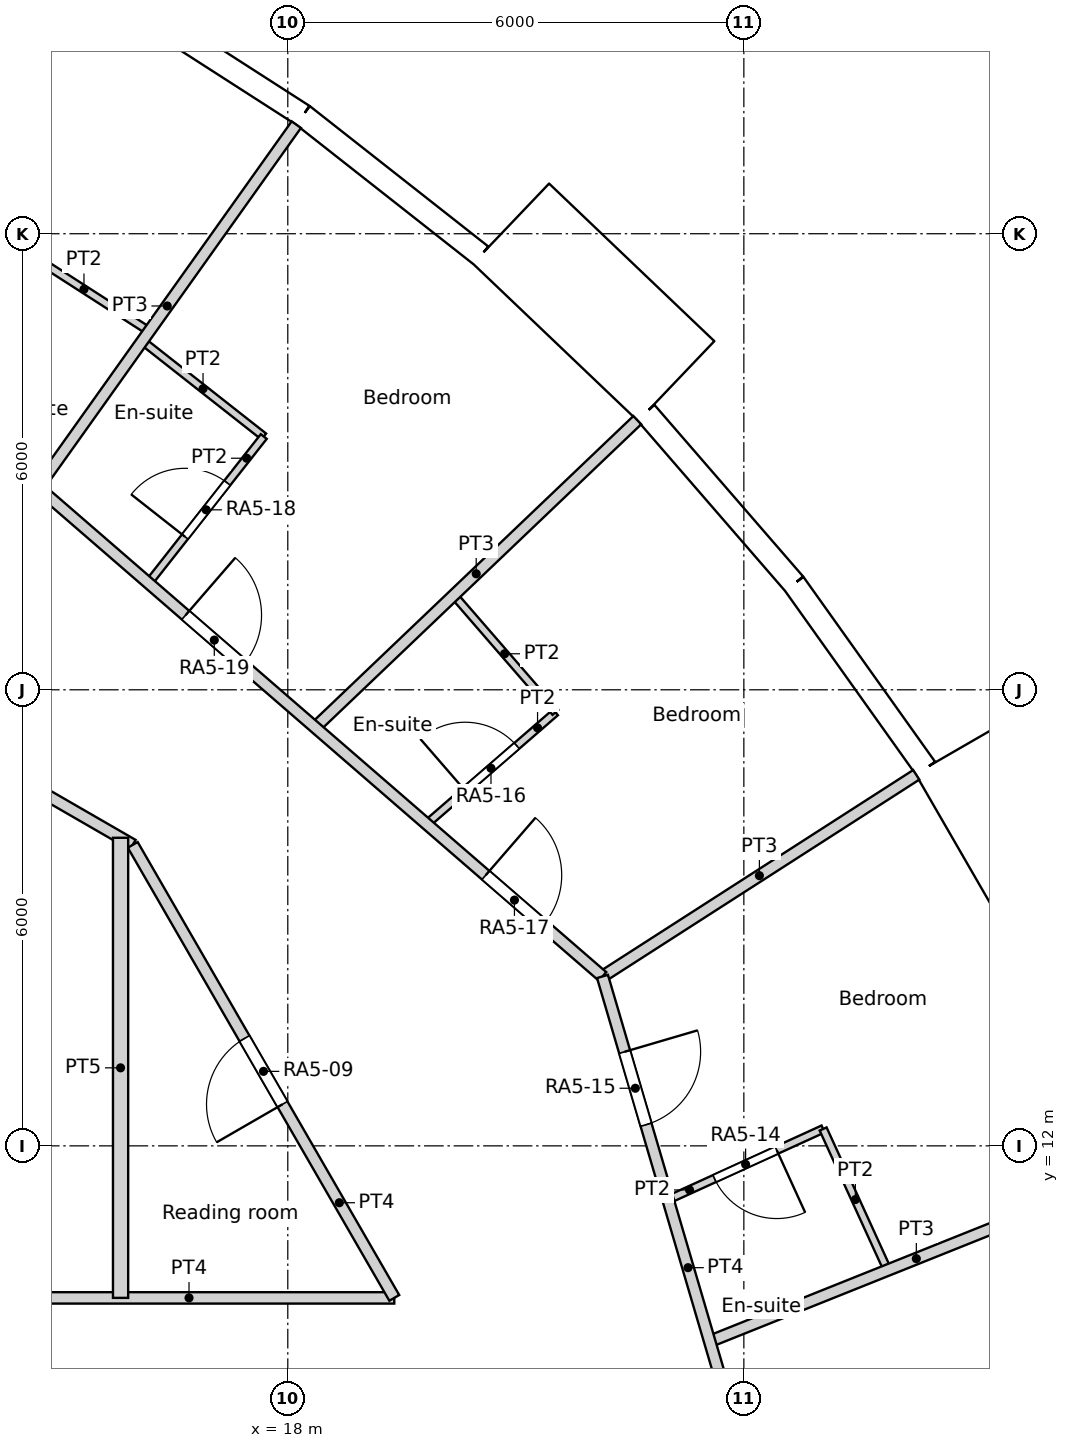
"""IFC4 building model, lengths in metres.
Left out: names, types, materials, properties, quantities, classifications, styles, units other than length and angle.
Written with IfcOpenShell. Run it as: python <this file> out.ifc"""

import sys

from ifc_helpers import new_model, si_unit, direction, frame, frame_2d, origin, origin_2d, place, context, subcontext, project, spatial, rectangle, circle, extrude, element, fill, save


model = new_model("IFC4")
c1 = context("Model", 3, precision=1e-05, world=origin(), true_north=direction((0.0, 1.0)))
c2 = subcontext(c1, "Body", "Model", "MODEL_VIEW")
j1 = project(units=[si_unit("LENGTHUNIT", "METRE"), si_unit("PLANEANGLEUNIT", "RADIAN")], contexts=[c1])
p1 = place(None, origin())
s1 = spatial("IfcSite", under=j1, at=p1, CompositionType="ELEMENT")
p2 = place(p1, origin())
s2 = spatial("IfcBuilding", under=s1, at=p2, CompositionType="ELEMENT")
p3 = place(p2, frame((0.0, 0.0, 71.4)))
s3 = spatial("IfcBuildingStorey", under=s2, at=p3, CompositionType="ELEMENT", Elevation=71.4)
for number, where, z_axis, x_axis in (
    (1, (25.469, 16.368, 0.0), (0.0, 0.0, 1.0), (1.0, 0.0, 0.0)),
    (2, (21.911, 20.892, 0.0), (0.0, 0.0, 1.0), (1.0, 0.0, 0.0)),
    (3, (17.561, 24.661, 0.0), (0.0, 0.0, 1.0), (1.0, 0.0, 0.0)),
):
    element("IfcColumn", number, at=place(p3, frame(where, z_axis=z_axis, x_axis=x_axis)), inside=s3, PredefinedType="COLUMN", context=c2, shape_type="SweptSolid", body=[
        extrude(circle(Radius=0.6, at=origin_2d()), origin(), (0.0, 0.0, 1.0), 3.6),
    ])
for number, where, z_axis, x_axis in (
    (4, (21.937, 11.017, 0.0), (0.0, 0.0, 1.0), (1.0, 0.0, 0.0)),
    (5, (18.805, 15.779, 0.0), (0.0, 0.0, 1.0), (1.0, 0.0, 0.0)),
    (6, (14.659, 19.69, 0.0), (0.0, 0.0, 1.0), (1.0, 0.0, 0.0)),
):
    element("IfcColumn", number, at=place(p3, frame(where, z_axis=z_axis, x_axis=x_axis)), inside=s3, PredefinedType="COLUMN", context=c2, shape_type="SweptSolid", body=[
        extrude(circle(Radius=0.65, at=origin_2d()), origin(), (0.0, 0.0, 1.0), 3.6),
    ])
p4 = place(p3, frame((15.552, 10.603, 0.0), z_axis=(0.0, 0.0, 1.0), x_axis=(1.0, 0.0, 0.0)))
e7 = element("IfcColumn", 7, at=p4, inside=s3, PredefinedType="COLUMN", context=c2, shape_type="SweptSolid", body=[
    extrude(circle(Radius=0.7, at=origin_2d()), origin(), (0.0, 0.0, 1.0), 3.6),
])
p5 = place(p3, frame((28.388, 14.658, -0.45), z_axis=(0.0, 0.0, 1.0), x_axis=(-0.499990139034, 0.866031096941, 0.0)))
e8 = element("IfcWall", 8, at=p5, inside=s3, PredefinedType="ELEMENTEDWALL", context=c2, shape_type="SweptSolid", body=[
    extrude(rectangle(XDim=3.0, YDim=1.45, at=frame_2d((1.5, 0.0))), origin(), (0.0, 0.0, 1.0), 3.6),
])
p6 = place(p5, frame((1.5, 0.0, 2.0)))
e9 = element("IfcOpeningElement", 9, at=p6, cuts=e8, PredefinedType="OPENING", context=c2, shape_type="SweptSolid", body=[
    extrude(circle(Radius=0.9, at=origin_2d()), frame((0.0, 0.735, 0.0), z_axis=(0.0, -1.0, 0.0), x_axis=(1.0, 0.0, 0.0)), (0.0, 0.0, 1.0), 1.47),
])
p7 = place(p3, frame((26.39, 16.967, 0.0), z_axis=(0.0, 0.0, 1.0), x_axis=(-0.580113774115, 0.814535456, 0.0)))
e10 = element("IfcWall", 10, at=p7, inside=s3, PredefinedType="SOLIDWALL", context=c2, shape_type="SweptSolid", body=[
    extrude(rectangle(XDim=2.98, YDim=0.3, at=frame_2d((1.49, 0.0))), origin(), (0.0, 0.0, 1.0), 3.15),
])
p8 = place(p7, frame((1.49, 0.0, 1.55)))
e11 = element("IfcOpeningElement", 11, at=p8, cuts=e10, PredefinedType="OPENING", context=c2, shape_type="SweptSolid", body=[
    extrude(circle(Radius=0.9, at=origin_2d()), frame((0.0, 0.16, 0.0), z_axis=(0.0, -1.0, 0.0), x_axis=(1.0, 0.0, 0.0)), (0.0, 0.0, 1.0), 0.32),
])
p9 = place(p3, frame((24.662, 19.394, 0.0), z_axis=(0.0, 0.0, 1.0), x_axis=(-0.654830712471, 0.755775587066, 0.0)))
e12 = element("IfcWall", 12, at=p9, inside=s3, PredefinedType="SOLIDWALL", context=c2, shape_type="SweptSolid", body=[
    extrude(rectangle(XDim=2.98, YDim=0.3, at=frame_2d((1.49, 0.0))), origin(), (0.0, 0.0, 1.0), 3.15),
])
p10 = place(p9, frame((1.49, 0.0, 1.55)))
e13 = element("IfcOpeningElement", 13, at=p10, cuts=e12, PredefinedType="OPENING", context=c2, shape_type="SweptSolid", body=[
    extrude(circle(Radius=0.9, at=origin_2d()), frame((0.0, 0.16, 0.0), z_axis=(0.0, -1.0, 0.0), x_axis=(1.0, 0.0, 0.0)), (0.0, 0.0, 1.0), 0.32),
])
p11 = place(p3, frame((23.109, 22.062, -0.45), z_axis=(0.0, 0.0, 1.0), x_axis=(-0.723712023899, 0.690102098579, 0.0)))
e14 = element("IfcWall", 14, at=p11, inside=s3, PredefinedType="ELEMENTEDWALL", context=c2, shape_type="SweptSolid", body=[
    extrude(rectangle(XDim=3.0, YDim=1.45, at=frame_2d((1.5, 0.0))), origin(), (0.0, 0.0, 1.0), 3.6),
])
p12 = place(p11, frame((1.5, 0.0, 2.0)))
e15 = element("IfcOpeningElement", 15, at=p12, cuts=e14, PredefinedType="OPENING", context=c2, shape_type="SweptSolid", body=[
    extrude(circle(Radius=0.9, at=origin_2d()), frame((0.0, 0.735, 0.0), z_axis=(0.0, -1.0, 0.0), x_axis=(1.0, 0.0, 0.0)), (0.0, 0.0, 1.0), 1.47),
])
p13 = place(p3, frame((20.541, 23.715, 0.0), z_axis=(0.0, 0.0, 1.0), x_axis=(-0.786053834673, 0.618158045322, 0.0)))
e16 = element("IfcWall", 16, at=p13, inside=s3, PredefinedType="SOLIDWALL", context=c2, shape_type="SweptSolid", body=[
    extrude(rectangle(XDim=2.979, YDim=0.3, at=frame_2d((1.49, 0.0))), origin(), (0.0, 0.0, 1.0), 3.15),
])
p14 = place(p13, frame((1.49, 0.0, 1.55)))
e17 = element("IfcOpeningElement", 17, at=p14, cuts=e16, PredefinedType="OPENING", context=c2, shape_type="SweptSolid", body=[
    extrude(circle(Radius=0.9, at=origin_2d()), frame((0.0, 0.16, 0.0), z_axis=(0.0, -1.0, 0.0), x_axis=(1.0, 0.0, 0.0)), (0.0, 0.0, 1.0), 0.32),
])
p15 = place(p3, frame((18.199, 25.557, 0.0), z_axis=(0.0, 0.0, 1.0), x_axis=(-0.841260995538, 0.54062920508, 0.0)))
e18 = element("IfcWall", 18, at=p15, inside=s3, PredefinedType="SOLIDWALL", context=c2, shape_type="SweptSolid", body=[
    extrude(rectangle(XDim=2.979, YDim=0.3, at=frame_2d((1.49, 0.0))), origin(), (0.0, 0.0, 1.0), 3.15),
])
p16 = place(p15, frame((1.49, 0.0, 1.55)))
e19 = element("IfcOpeningElement", 19, at=p16, cuts=e18, PredefinedType="OPENING", context=c2, shape_type="SweptSolid", body=[
    extrude(circle(Radius=0.9, at=origin_2d()), frame((0.0, 0.16, 0.0), z_axis=(0.0, -1.0, 0.0), x_axis=(1.0, 0.0, 0.0)), (0.0, 0.0, 1.0), 0.32),
])
p17 = place(p3, frame((14.0, 10.0, 0.0), z_axis=(0.0, 0.0, 1.0), x_axis=(1.0, 0.0, 0.0)))
e20 = element("IfcWall", 20, at=p17, inside=s3, PredefinedType="PARTITIONING", context=c2, shape_type="SweptSolid", body=[
    extrude(rectangle(XDim=5.401, YDim=0.15, at=frame_2d((2.7, 0.0))), origin(), (0.0, 0.0, 1.0), 3.15),
])
p18 = place(p3, frame((15.96, 15.96, 0.0), z_axis=(0.0, 0.0, 1.0), x_axis=(0.499992689227, -0.86602962462, 0.0)))
e21 = element("IfcWall", 21, at=p18, inside=s3, PredefinedType="PARTITIONING", context=c2, shape_type="SweptSolid", body=[
    extrude(rectangle(XDim=6.882, YDim=0.15, at=frame_2d((3.441, 0.0))), origin(), (0.0, 0.0, 1.0), 3.15),
])
p19 = place(p18, frame((2.941, 0.0, 0.0)))
e22 = element("IfcOpeningElement", 22, at=p19, cuts=e21, PredefinedType="OPENING", context=c2, shape_type="SweptSolid", body=[
    extrude(rectangle(XDim=1.0, YDim=2.04, at=frame_2d((0.5, 1.02))), frame((0.0, 0.075, 0.0), z_axis=(0.0, -1.0, 0.0), x_axis=(1.0, 0.0, 0.0)), (0.0, 0.0, 1.0), 0.15),
])
p20 = place(p3, frame((22.14, 14.229, 0.0), z_axis=(0.0, 0.0, 1.0), x_axis=(0.281780364869, -0.959478934617, 0.0)))
e23 = element("IfcWall", 23, at=p20, inside=s3, PredefinedType="PARTITIONING", context=c2, shape_type="SweptSolid", body=[
    extrude(rectangle(XDim=14.83, YDim=0.15, at=frame_2d((7.415, 0.0))), origin(), (0.0, 0.0, 1.0), 3.15),
])
p21 = place(p20, frame((10.816, 0.0, 0.0)))
e24 = element("IfcOpeningElement", 24, at=p21, cuts=e23, PredefinedType="OPENING", context=c2, shape_type="SweptSolid", body=[
    extrude(rectangle(XDim=1.0, YDim=2.1, at=frame_2d((0.5, 1.05))), frame((0.0, 0.075, 0.0), z_axis=(0.0, -1.0, 0.0), x_axis=(1.0, 0.0, 0.0)), (0.0, 0.0, 1.0), 0.15),
])
p22 = place(p20, frame((5.953, 0.0, 0.0)))
e25 = element("IfcOpeningElement", 25, at=p22, cuts=e23, PredefinedType="OPENING", context=c2, shape_type="SweptSolid", body=[
    extrude(rectangle(XDim=1.0, YDim=2.1, at=frame_2d((0.5, 1.05))), frame((0.0, 0.075, 0.0), z_axis=(0.0, -1.0, 0.0), x_axis=(1.0, 0.0, 0.0)), (0.0, 0.0, 1.0), 0.15),
])
p23 = place(p20, frame((1.033, 0.0, 0.0)))
e26 = element("IfcOpeningElement", 26, at=p23, cuts=e23, PredefinedType="OPENING", context=c2, shape_type="SweptSolid", body=[
    extrude(rectangle(XDim=1.0, YDim=2.1, at=frame_2d((0.5, 1.05))), frame((0.0, 0.075, 0.0), z_axis=(0.0, -1.0, 0.0), x_axis=(1.0, 0.0, 0.0)), (0.0, 0.0, 1.0), 0.15),
])
p24 = place(p3, frame((10.932, 23.939, 0.0), z_axis=(0.0, 0.0, 1.0), x_axis=(0.755838982892, -0.654757536757, 0.0)))
e27 = element("IfcWall", 27, at=p24, inside=s3, PredefinedType="PARTITIONING", context=c2, shape_type="SweptSolid", body=[
    extrude(rectangle(XDim=14.83, YDim=0.15, at=frame_2d((7.415, 0.0))), origin(), (0.0, 0.0, 1.0), 3.15),
])
p25 = place(p24, frame((12.796, 0.0, 0.0)))
e28 = element("IfcOpeningElement", 28, at=p25, cuts=e27, PredefinedType="OPENING", context=c2, shape_type="SweptSolid", body=[
    extrude(rectangle(XDim=1.0, YDim=2.1, at=frame_2d((0.5, 1.05))), frame((0.0, 0.075, 0.0), z_axis=(0.0, -1.0, 0.0), x_axis=(1.0, 0.0, 0.0)), (0.0, 0.0, 1.0), 0.15),
])
p26 = place(p24, frame((7.572, 0.0, 0.0)))
e29 = element("IfcOpeningElement", 29, at=p26, cuts=e27, PredefinedType="OPENING", context=c2, shape_type="SweptSolid", body=[
    extrude(rectangle(XDim=1.0, YDim=2.1, at=frame_2d((0.5, 1.05))), frame((0.0, 0.075, 0.0), z_axis=(0.0, -1.0, 0.0), x_axis=(1.0, 0.0, 0.0)), (0.0, 0.0, 1.0), 0.15),
])
p27 = place(p24, frame((1.033, 0.0, 0.0)))
e30 = element("IfcOpeningElement", 30, at=p27, cuts=e27, PredefinedType="OPENING", context=c2, shape_type="SweptSolid", body=[
    extrude(rectangle(XDim=1.0, YDim=2.1, at=frame_2d((0.5, 1.05))), frame((0.0, 0.075, 0.0), z_axis=(0.0, -1.0, 0.0), x_axis=(1.0, 0.0, 0.0)), (0.0, 0.0, 1.0), 0.15),
])
p28 = place(p3, frame((11.336, 18.63, 0.0), z_axis=(0.0, 0.0, 1.0), x_axis=(0.866056911224, -0.499945423543, 0.0)))
e31 = element("IfcWall", 31, at=p28, inside=s3, PredefinedType="PARTITIONING", context=c2, shape_type="SweptSolid", body=[
    extrude(rectangle(XDim=5.339, YDim=0.15, at=frame_2d((2.67, 0.0))), origin(), (0.0, 0.0, 1.0), 3.15),
])
p29 = place(p3, frame((15.8, 10.0, 0.0), z_axis=(0.0, 0.0, 1.0), x_axis=(0.0, 1.0, 0.0)))
e32 = element("IfcWall", 32, at=p29, inside=s3, PredefinedType="PARTITIONING", context=c2, shape_type="SweptSolid", body=[
    extrude(rectangle(XDim=6.053, YDim=0.2, at=frame_2d((3.026, 0.0))), origin(), (0.0, 0.0, 1.0), 3.15),
])
p30 = place(p3, frame((23.55, 9.427, 0.0), z_axis=(0.0, 0.0, 1.0), x_axis=(0.928307005382, 0.371814609393, 0.0)))
e33 = element("IfcWall", 33, at=p30, inside=s3, PredefinedType="PARTITIONING", context=c2, shape_type="SweptSolid", body=[
    extrude(rectangle(XDim=5.858, YDim=0.15, at=frame_2d((2.929, 0.0))), origin(), (0.0, 0.0, 1.0), 3.15),
])
p31 = place(p3, frame((25.043, 12.222, 0.0), z_axis=(0.0, 0.0, 1.0), x_axis=(0.41546015385, -0.909611378866, 0.0)))
e34 = element("IfcWall", 34, at=p31, inside=s3, PredefinedType="PARTITIONING", context=c2, shape_type="SweptSolid", body=[
    extrude(rectangle(XDim=2.042, YDim=0.1, at=frame_2d((1.021, 0.0))), origin(), (0.0, 0.0, 1.0), 3.15),
])
p32 = place(p3, frame((23.003, 11.291, 0.0), z_axis=(0.0, 0.0, 1.0), x_axis=(0.90975773562, 0.41513956988, 0.0)))
e35 = element("IfcWall", 35, at=p32, inside=s3, PredefinedType="PARTITIONING", context=c2, shape_type="SweptSolid", body=[
    extrude(rectangle(XDim=2.242, YDim=0.1, at=frame_2d((1.121, 0.0))), origin(), (0.0, 0.0, 1.0), 3.15),
])
p33 = place(p32, frame((0.671, 0.0, 0.0)))
e36 = element("IfcOpeningElement", 36, at=p33, cuts=e35, PredefinedType="OPENING", context=c2, shape_type="SweptSolid", body=[
    extrude(rectangle(XDim=0.9, YDim=2.04, at=frame_2d((0.45, 1.02))), frame((0.0, 0.05, 0.0), z_axis=(0.0, -1.0, 0.0), x_axis=(1.0, 0.0, 0.0)), (0.0, 0.0, 1.0), 0.1),
])
p34 = place(p3, frame((22.141, 14.229, 0.0), z_axis=(0.0, 0.0, 1.0), x_axis=(0.841265781699, 0.540621757371, 0.0)))
e37 = element("IfcWall", 37, at=p34, inside=s3, PredefinedType="PARTITIONING", context=c2, shape_type="SweptSolid", body=[
    extrude(rectangle(XDim=4.906, YDim=0.15, at=frame_2d((2.453, 0.0))), origin(), (0.0, 0.0, 1.0), 3.15),
])
p35 = place(p3, frame((19.826, 16.234, 0.0), z_axis=(0.0, 0.0, 1.0), x_axis=(0.755703447798, 0.654913963042, 0.0)))
e38 = element("IfcWall", 38, at=p35, inside=s3, PredefinedType="PARTITIONING", context=c2, shape_type="SweptSolid", body=[
    extrude(rectangle(XDim=2.243, YDim=0.1, at=frame_2d((1.122, 0.0))), origin(), (0.0, 0.0, 1.0), 3.15),
])
p36 = place(p35, frame((0.671, 0.0, 0.0)))
e39 = element("IfcOpeningElement", 39, at=p36, cuts=e38, PredefinedType="OPENING", context=c2, shape_type="SweptSolid", body=[
    extrude(rectangle(XDim=0.9, YDim=2.04, at=frame_2d((0.45, 1.02))), frame((0.0, 0.05, 0.0), z_axis=(0.0, -1.0, 0.0), x_axis=(1.0, 0.0, 0.0)), (0.0, 0.0, 1.0), 0.1),
])
p37 = place(p3, frame((20.184, 19.245, 0.0), z_axis=(0.0, 0.0, 1.0), x_axis=(0.655017058368, -0.755614090159, 0.0)))
e40 = element("IfcWall", 40, at=p37, inside=s3, PredefinedType="PARTITIONING", context=c2, shape_type="SweptSolid", body=[
    extrude(rectangle(XDim=2.041, YDim=0.1, at=frame_2d((1.021, 0.0))), origin(), (0.0, 0.0, 1.0), 3.15),
])
p38 = place(p3, frame((18.36, 17.505, 0.0), z_axis=(0.0, 0.0, 1.0), x_axis=(0.723686703731, 0.690128650937, 0.0)))
e41 = element("IfcWall", 41, at=p38, inside=s3, PredefinedType="PARTITIONING", context=c2, shape_type="SweptSolid", body=[
    extrude(rectangle(XDim=5.856, YDim=0.15, at=frame_2d((2.928, 0.0))), origin(), (0.0, 0.0, 1.0), 3.15),
])
p39 = place(p3, frame((16.168, 19.404, 0.0), z_axis=(0.0, 0.0, 1.0), x_axis=(0.618142414415, 0.786066126672, 0.0)))
e42 = element("IfcWall", 42, at=p39, inside=s3, PredefinedType="PARTITIONING", context=c2, shape_type="SweptSolid", body=[
    extrude(rectangle(XDim=2.453, YDim=0.1, at=frame_2d((1.226, 0.0))), origin(), (0.0, 0.0, 1.0), 3.15),
])
p40 = place(p39, frame((0.776, 0.0, 0.0)))
e43 = element("IfcOpeningElement", 43, at=p40, cuts=e42, PredefinedType="OPENING", context=c2, shape_type="SweptSolid", body=[
    extrude(rectangle(XDim=0.9, YDim=2.04, at=frame_2d((0.45, 1.02))), frame((0.0, 0.05, 0.0), z_axis=(0.0, -1.0, 0.0), x_axis=(1.0, 0.0, 0.0)), (0.0, 0.0, 1.0), 0.1),
])
p41 = place(p3, frame((16.086, 22.589, 0.0), z_axis=(0.0, 0.0, 1.0), x_axis=(0.785984904201, -0.618245687707, 0.0)))
e44 = element("IfcWall", 44, at=p41, inside=s3, PredefinedType="PARTITIONING", context=c2, shape_type="SweptSolid", body=[
    extrude(rectangle(XDim=2.033, YDim=0.1, at=frame_2d((1.017, 0.0))), origin(), (0.0, 0.0, 1.0), 3.15),
])
p42 = place(p3, frame((14.715, 20.664, 0.0), z_axis=(0.0, 0.0, 1.0), x_axis=(0.57995989616, 0.814645026282, 0.0)))
e45 = element("IfcWall", 45, at=p42, inside=s3, PredefinedType="PARTITIONING", context=c2, shape_type="SweptSolid", body=[
    extrude(rectangle(XDim=5.857, YDim=0.15, at=frame_2d((2.928, 0.0))), origin(), (0.0, 0.0, 1.0), 3.15),
])
p43 = place(p3, frame((14.46, 23.821, 0.0), z_axis=(0.0, 0.0, 1.0), x_axis=(0.841135728185, -0.540824081168, 0.0)))
e46 = element("IfcWall", 46, at=p43, inside=s3, PredefinedType="PARTITIONING", context=c2, shape_type="SweptSolid", body=[
    extrude(rectangle(XDim=2.041, YDim=0.1, at=frame_2d((1.021, 0.0))), origin(), (0.0, 0.0, 1.0), 3.15),
])
p44 = place(p6, origin())
e47 = element("IfcWindow", 47, at=p44, inside=s3, PartitioningType="SINGLE_PANEL", PredefinedType="WINDOW", context=c2, shape_type="SweptSolid", body=[
    extrude(circle(Radius=0.9, at=origin_2d()), frame((0.0, 0.695, 0.0), z_axis=(0.0, -1.0, 0.0), x_axis=(1.0, 0.0, 0.0)), (0.0, 0.0, 1.0), 0.1),
])
fill(e9, e47)
p45 = place(p8, origin())
e48 = element("IfcWindow", 48, at=p45, inside=s3, PartitioningType="SINGLE_PANEL", PredefinedType="WINDOW", context=c2, shape_type="SweptSolid", body=[
    extrude(circle(Radius=0.9, at=origin_2d()), frame((0.0, 0.12, 0.0), z_axis=(0.0, -1.0, 0.0), x_axis=(1.0, 0.0, 0.0)), (0.0, 0.0, 1.0), 0.1),
])
fill(e11, e48)
p46 = place(p10, origin())
e49 = element("IfcWindow", 49, at=p46, inside=s3, PartitioningType="SINGLE_PANEL", PredefinedType="WINDOW", context=c2, shape_type="SweptSolid", body=[
    extrude(circle(Radius=0.9, at=origin_2d()), frame((0.0, 0.12, 0.0), z_axis=(0.0, -1.0, 0.0), x_axis=(1.0, 0.0, 0.0)), (0.0, 0.0, 1.0), 0.1),
])
fill(e13, e49)
p47 = place(p12, origin())
e50 = element("IfcWindow", 50, at=p47, inside=s3, PartitioningType="SINGLE_PANEL", PredefinedType="WINDOW", context=c2, shape_type="SweptSolid", body=[
    extrude(circle(Radius=0.9, at=origin_2d()), frame((0.0, 0.695, 0.0), z_axis=(0.0, -1.0, 0.0), x_axis=(1.0, 0.0, 0.0)), (0.0, 0.0, 1.0), 0.1),
])
fill(e15, e50)
p48 = place(p14, origin())
e51 = element("IfcWindow", 51, at=p48, inside=s3, PartitioningType="SINGLE_PANEL", PredefinedType="WINDOW", context=c2, shape_type="SweptSolid", body=[
    extrude(circle(Radius=0.9, at=origin_2d()), frame((0.0, 0.12, 0.0), z_axis=(0.0, -1.0, 0.0), x_axis=(1.0, 0.0, 0.0)), (0.0, 0.0, 1.0), 0.1),
])
fill(e17, e51)
p49 = place(p16, origin())
e52 = element("IfcWindow", 52, at=p49, inside=s3, PartitioningType="SINGLE_PANEL", PredefinedType="WINDOW", context=c2, shape_type="SweptSolid", body=[
    extrude(circle(Radius=0.9, at=origin_2d()), frame((0.0, 0.12, 0.0), z_axis=(0.0, -1.0, 0.0), x_axis=(1.0, 0.0, 0.0)), (0.0, 0.0, 1.0), 0.1),
])
fill(e19, e52)
p50 = place(p19, origin())
e53 = element("IfcDoor", 53, at=p50, inside=s3, OperationType="SINGLE_SWING_LEFT", PredefinedType="DOOR", context=c2, shape_type="SweptSolid", body=[
    extrude(rectangle(XDim=1.0, YDim=2.04, at=frame_2d((0.5, 1.02))), frame((0.0, 0.025, 0.0), z_axis=(0.0, -1.0, 0.0), x_axis=(1.0, 0.0, 0.0)), (0.0, 0.0, 1.0), 0.05),
])
fill(e22, e53)
p51 = place(p33, origin())
e54 = element("IfcDoor", 54, at=p51, inside=s3, OperationType="SINGLE_SWING_LEFT", PredefinedType="DOOR", context=c2, shape_type="SweptSolid", body=[
    extrude(rectangle(XDim=0.9, YDim=2.04, at=frame_2d((0.45, 1.02))), frame((0.0, 0.025, 0.0), z_axis=(0.0, -1.0, 0.0), x_axis=(1.0, 0.0, 0.0)), (0.0, 0.0, 1.0), 0.05),
])
fill(e36, e54)
p52 = place(p23, origin())
e55 = element("IfcDoor", 55, at=p52, inside=s3, OperationType="SINGLE_SWING_LEFT", PredefinedType="DOOR", context=c2, shape_type="SweptSolid", body=[
    extrude(rectangle(XDim=1.0, YDim=2.1, at=frame_2d((0.5, 1.05))), frame((0.0, 0.025, 0.0), z_axis=(0.0, -1.0, 0.0), x_axis=(1.0, 0.0, 0.0)), (0.0, 0.0, 1.0), 0.05),
])
fill(e26, e55)
p53 = place(p36, origin())
e56 = element("IfcDoor", 56, at=p53, inside=s3, OperationType="SINGLE_SWING_LEFT", PredefinedType="DOOR", context=c2, shape_type="SweptSolid", body=[
    extrude(rectangle(XDim=0.9, YDim=2.04, at=frame_2d((0.45, 1.02))), frame((0.0, 0.025, 0.0), z_axis=(0.0, -1.0, 0.0), x_axis=(1.0, 0.0, 0.0)), (0.0, 0.0, 1.0), 0.05),
])
fill(e39, e56)
p54 = place(p25, origin())
e57 = element("IfcDoor", 57, at=p54, inside=s3, OperationType="SINGLE_SWING_LEFT", PredefinedType="DOOR", context=c2, shape_type="SweptSolid", body=[
    extrude(rectangle(XDim=1.0, YDim=2.1, at=frame_2d((0.5, 1.05))), frame((0.0, 0.025, 0.0), z_axis=(0.0, -1.0, 0.0), x_axis=(1.0, 0.0, 0.0)), (0.0, 0.0, 1.0), 0.05),
])
fill(e28, e57)
p55 = place(p40, origin())
e58 = element("IfcDoor", 58, at=p55, inside=s3, OperationType="SINGLE_SWING_LEFT", PredefinedType="DOOR", context=c2, shape_type="SweptSolid", body=[
    extrude(rectangle(XDim=0.9, YDim=2.04, at=frame_2d((0.45, 1.02))), frame((0.0, 0.025, 0.0), z_axis=(0.0, -1.0, 0.0), x_axis=(1.0, 0.0, 0.0)), (0.0, 0.0, 1.0), 0.05),
])
fill(e43, e58)
p56 = place(p26, origin())
e59 = element("IfcDoor", 59, at=p56, inside=s3, OperationType="SINGLE_SWING_LEFT", PredefinedType="DOOR", context=c2, shape_type="SweptSolid", body=[
    extrude(rectangle(XDim=1.0, YDim=2.1, at=frame_2d((0.5, 1.05))), frame((0.0, 0.025, 0.0), z_axis=(0.0, -1.0, 0.0), x_axis=(1.0, 0.0, 0.0)), (0.0, 0.0, 1.0), 0.05),
])
fill(e29, e59)
save(model, sys.argv[1])
